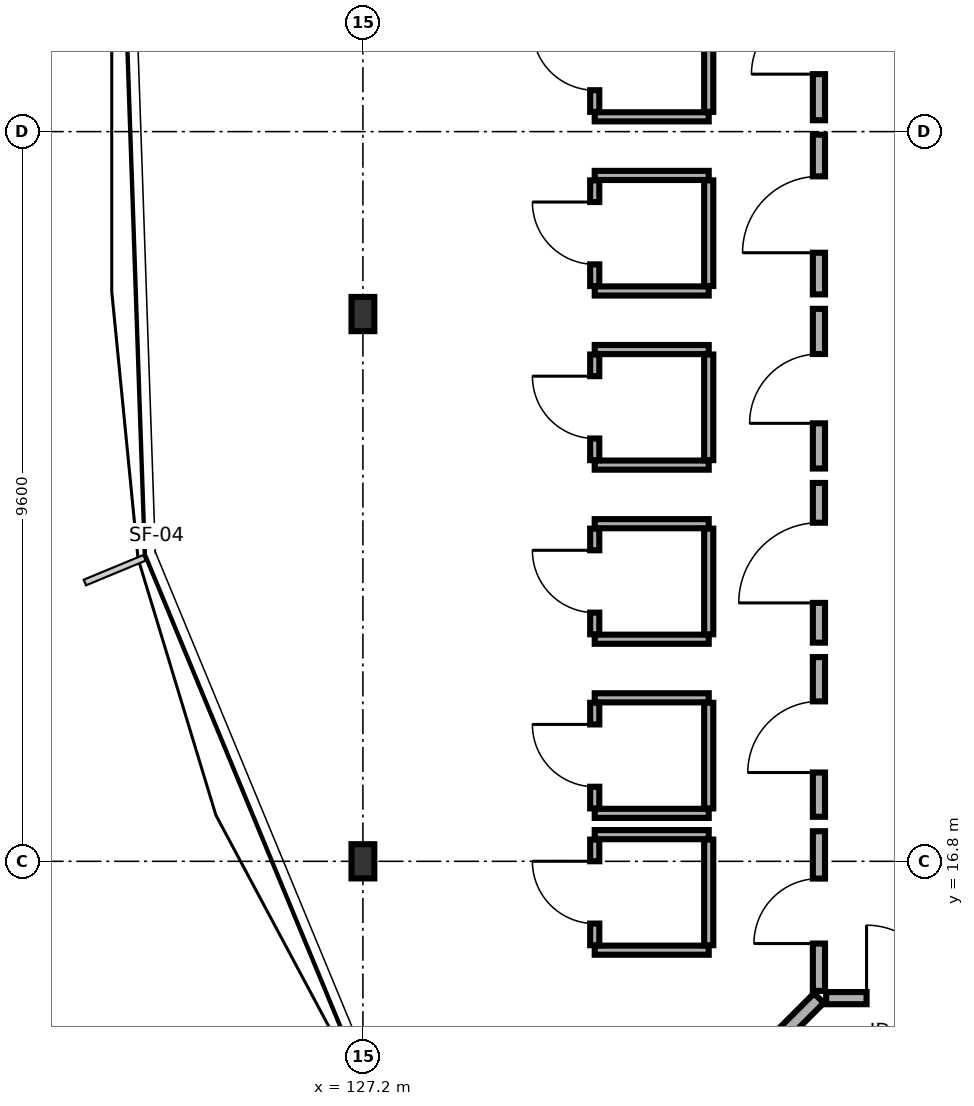
"""IFC4 building model, lengths in metres.
Left out: names, types, materials, properties, quantities, classifications, styles, units other than length and angle.
Written with IfcOpenShell. Run it as: python <this file> out.ifc"""

import sys

from ifc_helpers import new_model, si_unit, direction, frame, frame_2d, origin, origin_2d, place, context, subcontext, project, spatial, rectangle, i_section, extrude, element, fill, save


model = new_model("IFC4")
c1 = context("Model", 3, precision=1e-05, world=origin(), true_north=direction((0.0, 1.0)))
c2 = subcontext(c1, "Body", "Model", "MODEL_VIEW")
j1 = project(units=[si_unit("LENGTHUNIT", "METRE"), si_unit("PLANEANGLEUNIT", "RADIAN")], contexts=[c1])
p1 = place(None, origin())
s1 = spatial("IfcSite", under=j1, at=p1, CompositionType="ELEMENT")
p2 = place(p1, origin())
s2 = spatial("IfcBuilding", under=s1, at=p2, CompositionType="ELEMENT")
p3 = place(p2, frame((0.0, 0.0, 28.3)))
s3 = spatial("IfcBuildingStorey", under=s2, at=p3, CompositionType="ELEMENT", Elevation=28.3)
for number, where, z_axis, x_axis in (
    (1, (127.2, 24.0, 0.0), (0.0, 0.0, 1.0), (1.0, 0.0, 0.0)),
    (2, (127.2, 16.8, 0.0), (0.0, 0.0, 1.0), (1.0, 0.0, 0.0)),
):
    element("IfcColumn", number, at=place(p3, frame(where, z_axis=z_axis, x_axis=x_axis)), inside=s3, PredefinedType="COLUMN", context=c2, shape_type="SweptSolid", body=[
        extrude(i_section(OverallWidth=0.3, OverallDepth=0.45, WebThickness=0.014, FlangeThickness=0.026, FilletRadius=0.027, at=origin_2d()), origin(), (0.0, 0.0, 1.0), 3.4),
    ])
p4 = place(p3, frame((133.295, 15.0, 0.0), z_axis=(0.0, 0.0, 1.0), x_axis=(1.0, 0.0, 0.0)))
e3 = element("IfcWall", 3, at=p4, inside=s3, PredefinedType="PARTITIONING", context=c2, shape_type="SweptSolid", body=[
    extrude(rectangle(XDim=2.024, YDim=0.16, at=frame_2d((1.012, 0.0))), origin(), (0.0, 0.0, 1.0), 3.175),
])
p5 = place(p4, frame((0.532, 0.0, 0.0)))
e4 = element("IfcOpeningElement", 4, at=p5, cuts=e3, PredefinedType="OPENING", context=c2, shape_type="SweptSolid", body=[
    extrude(rectangle(XDim=0.96, YDim=2.13, at=frame_2d((0.48, 1.065))), frame((0.0, 0.09, 0.0), z_axis=(0.0, -1.0, 0.0), x_axis=(1.0, 0.0, 0.0)), (0.0, 0.0, 1.0), 0.18),
])
p6 = place(p3, frame((133.2, 15.0, 0.0), z_axis=(0.0, 0.0, 1.0), x_axis=(-0.707082692656, -0.707130868897, 0.0)))
e5 = element("IfcWall", 5, at=p6, inside=s3, PredefinedType="PARTITIONING", context=c2, shape_type="SweptSolid", body=[
    extrude(rectangle(XDim=5.068, YDim=0.18, at=frame_2d((2.534, 0.0))), origin(), (0.0, 0.0, 1.0), 2.66),
])
p7 = place(p3, frame((133.2, 26.55, 0.0), z_axis=(0.0, 0.0, 1.0), x_axis=(0.0, 1.0, 0.0)))
e6 = element("IfcWall", 6, at=p7, inside=s3, PredefinedType="PARTITIONING", context=c2, shape_type="SweptSolid", body=[
    extrude(rectangle(XDim=2.101, YDim=0.16, at=frame_2d((1.05, 0.0))), origin(), (0.0, 0.0, 1.0), 3.175),
])
p8 = place(p7, frame((0.606, 0.0, 0.0)))
e7 = element("IfcOpeningElement", 7, at=p8, cuts=e6, PredefinedType="OPENING", context=c2, shape_type="SweptSolid", body=[
    extrude(rectangle(XDim=0.888, YDim=2.07, at=frame_2d((0.444, 1.035))), frame((0.0, 0.09, 0.0), z_axis=(0.0, -1.0, 0.0), x_axis=(1.0, 0.0, 0.0)), (0.0, 0.0, 1.0), 0.18),
])
p9 = place(p3, frame((130.25, 26.594, 0.0), z_axis=(0.0, 0.0, 1.0), x_axis=(1.0, 0.0, 0.0)))
e8 = element("IfcWall", 8, at=p9, inside=s3, PredefinedType="PARTITIONING", context=c2, shape_type="SweptSolid", body=[
    extrude(rectangle(XDim=1.5, YDim=0.12, at=frame_2d((0.75, 0.0))), origin(), (0.0, 0.0, 1.0), 3.175),
])
p10 = place(p3, frame((130.25, 26.66, 0.0), z_axis=(0.0, 0.0, 1.0), x_axis=(0.0, 1.0, 0.0)))
e9 = element("IfcWall", 9, at=p10, inside=s3, PredefinedType="PARTITIONING", context=c2, shape_type="SweptSolid", body=[
    extrude(rectangle(XDim=1.39, YDim=0.12, at=frame_2d((0.695, 0.0))), origin(), (0.0, 0.0, 1.0), 3.175),
])
p11 = place(p10, frame((0.285, 0.0, 0.0)))
e10 = element("IfcOpeningElement", 10, at=p11, cuts=e9, PredefinedType="OPENING", context=c2, shape_type="SweptSolid", body=[
    extrude(rectangle(XDim=0.82, YDim=2.08, at=frame_2d((0.41, 1.04))), frame((0.0, 0.07, 0.0), z_axis=(0.0, -1.0, 0.0), x_axis=(1.0, 0.0, 0.0)), (0.0, 0.0, 1.0), 0.14),
])
p12 = place(p3, frame((131.75, 26.66, 0.0), z_axis=(0.0, 0.0, 1.0), x_axis=(0.0, 1.0, 0.0)))
e11 = element("IfcWall", 11, at=p12, inside=s3, PredefinedType="PARTITIONING", context=c2, shape_type="SweptSolid", body=[
    extrude(rectangle(XDim=1.39, YDim=0.12, at=frame_2d((0.695, 0.0))), origin(), (0.0, 0.0, 1.0), 3.175),
])
p13 = place(p3, frame((133.2, 24.259, 0.0), z_axis=(0.0, 0.0, 1.0), x_axis=(0.0, 1.0, 0.0)))
e12 = element("IfcWall", 12, at=p13, inside=s3, PredefinedType="PARTITIONING", context=c2, shape_type="SweptSolid", body=[
    extrude(rectangle(XDim=2.101, YDim=0.16, at=frame_2d((1.051, 0.0))), origin(), (0.0, 0.0, 1.0), 3.175),
])
p14 = place(p13, frame((0.548, 0.0, 0.0)))
e13 = element("IfcOpeningElement", 13, at=p14, cuts=e12, PredefinedType="OPENING", context=c2, shape_type="SweptSolid", body=[
    extrude(rectangle(XDim=1.005, YDim=2.05, at=frame_2d((0.502, 1.025))), frame((0.0, 0.09, 0.0), z_axis=(0.0, -1.0, 0.0), x_axis=(1.0, 0.0, 0.0)), (0.0, 0.0, 1.0), 0.18),
])
for number, where, z_axis, x_axis in (
    (14, (130.25, 24.304, 0.0), (0.0, 0.0, 1.0), (1.0, 0.0, 0.0)),
    (15, (130.25, 25.823, 0.0), (0.0, 0.0, 1.0), (1.0, 0.0, 0.0)),
):
    element("IfcWall", number, at=place(p3, frame(where, z_axis=z_axis, x_axis=x_axis)), inside=s3, PredefinedType="PARTITIONING", context=c2, shape_type="SweptSolid", body=[
        extrude(rectangle(XDim=1.5, YDim=0.12, at=frame_2d((0.75, 0.0))), origin(), (0.0, 0.0, 1.0), 3.175),
    ])
p15 = place(p3, frame((130.25, 24.369, 0.0), z_axis=(0.0, 0.0, 1.0), x_axis=(0.0, 1.0, 0.0)))
e16 = element("IfcWall", 16, at=p15, inside=s3, PredefinedType="PARTITIONING", context=c2, shape_type="SweptSolid", body=[
    extrude(rectangle(XDim=1.39, YDim=0.12, at=frame_2d((0.695, 0.0))), origin(), (0.0, 0.0, 1.0), 3.175),
])
p16 = place(p15, frame((0.285, 0.0, 0.0)))
e17 = element("IfcOpeningElement", 17, at=p16, cuts=e16, PredefinedType="OPENING", context=c2, shape_type="SweptSolid", body=[
    extrude(rectangle(XDim=0.82, YDim=2.08, at=frame_2d((0.41, 1.04))), frame((0.0, 0.07, 0.0), z_axis=(0.0, -1.0, 0.0), x_axis=(1.0, 0.0, 0.0)), (0.0, 0.0, 1.0), 0.14),
])
p17 = place(p3, frame((131.75, 24.369, 0.0), z_axis=(0.0, 0.0, 1.0), x_axis=(0.0, 1.0, 0.0)))
e18 = element("IfcWall", 18, at=p17, inside=s3, PredefinedType="PARTITIONING", context=c2, shape_type="SweptSolid", body=[
    extrude(rectangle(XDim=1.39, YDim=0.12, at=frame_2d((0.695, 0.0))), origin(), (0.0, 0.0, 1.0), 3.175),
])
p18 = place(p3, frame((133.2, 21.968, 0.0), z_axis=(0.0, 0.0, 1.0), x_axis=(0.0, 1.0, 0.0)))
e19 = element("IfcWall", 19, at=p18, inside=s3, PredefinedType="PARTITIONING", context=c2, shape_type="SweptSolid", body=[
    extrude(rectangle(XDim=2.101, YDim=0.16, at=frame_2d((1.05, 0.0))), origin(), (0.0, 0.0, 1.0), 2.71),
])
p19 = place(p18, frame((0.594, 0.0, 0.0)))
e20 = element("IfcOpeningElement", 20, at=p19, cuts=e19, PredefinedType="OPENING", context=c2, shape_type="SweptSolid", body=[
    extrude(rectangle(XDim=0.912, YDim=2.13, at=frame_2d((0.456, 1.065))), frame((0.0, 0.09, 0.0), z_axis=(0.0, -1.0, 0.0), x_axis=(1.0, 0.0, 0.0)), (0.0, 0.0, 1.0), 0.18),
])
for number, where, z_axis, x_axis in (
    (21, (130.25, 22.013, 0.0), (0.0, 0.0, 1.0), (1.0, 0.0, 0.0)),
    (22, (130.25, 23.533, 0.0), (0.0, 0.0, 1.0), (1.0, 0.0, 0.0)),
):
    element("IfcWall", number, at=place(p3, frame(where, z_axis=z_axis, x_axis=x_axis)), inside=s3, PredefinedType="PARTITIONING", context=c2, shape_type="SweptSolid", body=[
        extrude(rectangle(XDim=1.5, YDim=0.12, at=frame_2d((0.75, 0.0))), origin(), (0.0, 0.0, 1.0), 3.175),
    ])
p20 = place(p3, frame((130.25, 22.078, 0.0), z_axis=(0.0, 0.0, 1.0), x_axis=(0.0, 1.0, 0.0)))
e23 = element("IfcWall", 23, at=p20, inside=s3, PredefinedType="PARTITIONING", context=c2, shape_type="SweptSolid", body=[
    extrude(rectangle(XDim=1.39, YDim=0.12, at=frame_2d((0.695, 0.0))), origin(), (0.0, 0.0, 1.0), 3.175),
])
p21 = place(p20, frame((0.285, 0.0, 0.0)))
e24 = element("IfcOpeningElement", 24, at=p21, cuts=e23, PredefinedType="OPENING", context=c2, shape_type="SweptSolid", body=[
    extrude(rectangle(XDim=0.82, YDim=2.08, at=frame_2d((0.41, 1.04))), frame((0.0, 0.07, 0.0), z_axis=(0.0, -1.0, 0.0), x_axis=(1.0, 0.0, 0.0)), (0.0, 0.0, 1.0), 0.14),
])
p22 = place(p3, frame((131.75, 22.078, 0.0), z_axis=(0.0, 0.0, 1.0), x_axis=(0.0, 1.0, 0.0)))
e25 = element("IfcWall", 25, at=p22, inside=s3, PredefinedType="PARTITIONING", context=c2, shape_type="SweptSolid", body=[
    extrude(rectangle(XDim=1.39, YDim=0.12, at=frame_2d((0.695, 0.0))), origin(), (0.0, 0.0, 1.0), 3.175),
])
p23 = place(p3, frame((133.2, 19.677, 0.0), z_axis=(0.0, 0.0, 1.0), x_axis=(0.0, 1.0, 0.0)))
e26 = element("IfcWall", 26, at=p23, inside=s3, PredefinedType="PARTITIONING", context=c2, shape_type="SweptSolid", body=[
    extrude(rectangle(XDim=2.101, YDim=0.16, at=frame_2d((1.05, 0.0))), origin(), (0.0, 0.0, 1.0), 3.175),
])
p24 = place(p23, frame((0.523, 0.0, 0.0)))
e27 = element("IfcOpeningElement", 27, at=p24, cuts=e26, PredefinedType="OPENING", context=c2, shape_type="SweptSolid", body=[
    extrude(rectangle(XDim=1.055, YDim=2.05, at=frame_2d((0.527, 1.025))), frame((0.0, 0.09, 0.0), z_axis=(0.0, -1.0, 0.0), x_axis=(1.0, 0.0, 0.0)), (0.0, 0.0, 1.0), 0.18),
])
for number, where, z_axis, x_axis in (
    (28, (130.25, 19.722, 0.0), (0.0, 0.0, 1.0), (1.0, 0.0, 0.0)),
    (29, (130.25, 21.242, 0.0), (0.0, 0.0, 1.0), (1.0, 0.0, 0.0)),
):
    element("IfcWall", number, at=place(p3, frame(where, z_axis=z_axis, x_axis=x_axis)), inside=s3, PredefinedType="PARTITIONING", context=c2, shape_type="SweptSolid", body=[
        extrude(rectangle(XDim=1.5, YDim=0.12, at=frame_2d((0.75, 0.0))), origin(), (0.0, 0.0, 1.0), 3.175),
    ])
p25 = place(p3, frame((130.25, 19.787, 0.0), z_axis=(0.0, 0.0, 1.0), x_axis=(0.0, 1.0, 0.0)))
e30 = element("IfcWall", 30, at=p25, inside=s3, PredefinedType="PARTITIONING", context=c2, shape_type="SweptSolid", body=[
    extrude(rectangle(XDim=1.39, YDim=0.12, at=frame_2d((0.695, 0.0))), origin(), (0.0, 0.0, 1.0), 3.175),
])
p26 = place(p25, frame((0.285, 0.0, 0.0)))
e31 = element("IfcOpeningElement", 31, at=p26, cuts=e30, PredefinedType="OPENING", context=c2, shape_type="SweptSolid", body=[
    extrude(rectangle(XDim=0.82, YDim=2.08, at=frame_2d((0.41, 1.04))), frame((0.0, 0.07, 0.0), z_axis=(0.0, -1.0, 0.0), x_axis=(1.0, 0.0, 0.0)), (0.0, 0.0, 1.0), 0.14),
])
p27 = place(p3, frame((131.75, 19.787, 0.0), z_axis=(0.0, 0.0, 1.0), x_axis=(0.0, 1.0, 0.0)))
e32 = element("IfcWall", 32, at=p27, inside=s3, PredefinedType="PARTITIONING", context=c2, shape_type="SweptSolid", body=[
    extrude(rectangle(XDim=1.39, YDim=0.12, at=frame_2d((0.695, 0.0))), origin(), (0.0, 0.0, 1.0), 3.175),
])
p28 = place(p3, frame((133.2, 17.386, 0.0), z_axis=(0.0, 0.0, 1.0), x_axis=(0.0, 1.0, 0.0)))
e33 = element("IfcWall", 33, at=p28, inside=s3, PredefinedType="PARTITIONING", context=c2, shape_type="SweptSolid", body=[
    extrude(rectangle(XDim=2.101, YDim=0.16, at=frame_2d((1.05, 0.0))), origin(), (0.0, 0.0, 1.0), 3.175),
])
p29 = place(p28, frame((0.583, 0.0, 0.0)))
e34 = element("IfcOpeningElement", 34, at=p29, cuts=e33, PredefinedType="OPENING", context=c2, shape_type="SweptSolid", body=[
    extrude(rectangle(XDim=0.936, YDim=2.07, at=frame_2d((0.468, 1.035))), frame((0.0, 0.09, 0.0), z_axis=(0.0, -1.0, 0.0), x_axis=(1.0, 0.0, 0.0)), (0.0, 0.0, 1.0), 0.18),
])
for number, where, z_axis, x_axis in (
    (35, (130.25, 17.431, 0.0), (0.0, 0.0, 1.0), (1.0, 0.0, 0.0)),
    (36, (130.25, 18.951, 0.0), (0.0, 0.0, 1.0), (1.0, 0.0, 0.0)),
):
    element("IfcWall", number, at=place(p3, frame(where, z_axis=z_axis, x_axis=x_axis)), inside=s3, PredefinedType="PARTITIONING", context=c2, shape_type="SweptSolid", body=[
        extrude(rectangle(XDim=1.5, YDim=0.12, at=frame_2d((0.75, 0.0))), origin(), (0.0, 0.0, 1.0), 3.175),
    ])
p30 = place(p3, frame((130.25, 17.496, 0.0), z_axis=(0.0, 0.0, 1.0), x_axis=(0.0, 1.0, 0.0)))
e37 = element("IfcWall", 37, at=p30, inside=s3, PredefinedType="PARTITIONING", context=c2, shape_type="SweptSolid", body=[
    extrude(rectangle(XDim=1.39, YDim=0.12, at=frame_2d((0.695, 0.0))), origin(), (0.0, 0.0, 1.0), 3.175),
])
p31 = place(p30, frame((0.285, 0.0, 0.0)))
e38 = element("IfcOpeningElement", 38, at=p31, cuts=e37, PredefinedType="OPENING", context=c2, shape_type="SweptSolid", body=[
    extrude(rectangle(XDim=0.82, YDim=2.08, at=frame_2d((0.41, 1.04))), frame((0.0, 0.07, 0.0), z_axis=(0.0, -1.0, 0.0), x_axis=(1.0, 0.0, 0.0)), (0.0, 0.0, 1.0), 0.14),
])
p32 = place(p3, frame((131.75, 17.496, 0.0), z_axis=(0.0, 0.0, 1.0), x_axis=(0.0, 1.0, 0.0)))
e39 = element("IfcWall", 39, at=p32, inside=s3, PredefinedType="PARTITIONING", context=c2, shape_type="SweptSolid", body=[
    extrude(rectangle(XDim=1.39, YDim=0.12, at=frame_2d((0.695, 0.0))), origin(), (0.0, 0.0, 1.0), 3.175),
])
p33 = place(p3, frame((133.2, 15.095, 0.0), z_axis=(0.0, 0.0, 1.0), x_axis=(0.0, 1.0, 0.0)))
e40 = element("IfcWall", 40, at=p33, inside=s3, PredefinedType="PARTITIONING", context=c2, shape_type="SweptSolid", body=[
    extrude(rectangle(XDim=2.101, YDim=0.16, at=frame_2d((1.05, 0.0))), origin(), (0.0, 0.0, 1.0), 2.71),
])
p34 = place(p33, frame((0.623, 0.0, 0.0)))
e41 = element("IfcOpeningElement", 41, at=p34, cuts=e40, PredefinedType="OPENING", context=c2, shape_type="SweptSolid", body=[
    extrude(rectangle(XDim=0.855, YDim=2.05, at=frame_2d((0.427, 1.025))), frame((0.0, 0.09, 0.0), z_axis=(0.0, -1.0, 0.0), x_axis=(1.0, 0.0, 0.0)), (0.0, 0.0, 1.0), 0.18),
])
for number, where, z_axis, x_axis in (
    (42, (130.25, 15.631, 0.0), (0.0, 0.0, 1.0), (1.0, 0.0, 0.0)),
    (43, (130.25, 17.151, 0.0), (0.0, 0.0, 1.0), (1.0, 0.0, 0.0)),
):
    element("IfcWall", number, at=place(p3, frame(where, z_axis=z_axis, x_axis=x_axis)), inside=s3, PredefinedType="PARTITIONING", context=c2, shape_type="SweptSolid", body=[
        extrude(rectangle(XDim=1.5, YDim=0.12, at=frame_2d((0.75, 0.0))), origin(), (0.0, 0.0, 1.0), 3.175),
    ])
p35 = place(p3, frame((130.25, 15.696, 0.0), z_axis=(0.0, 0.0, 1.0), x_axis=(0.0, 1.0, 0.0)))
e44 = element("IfcWall", 44, at=p35, inside=s3, PredefinedType="PARTITIONING", context=c2, shape_type="SweptSolid", body=[
    extrude(rectangle(XDim=1.39, YDim=0.12, at=frame_2d((0.695, 0.0))), origin(), (0.0, 0.0, 1.0), 2.71),
])
p36 = place(p35, frame((0.285, 0.0, 0.0)))
e45 = element("IfcOpeningElement", 45, at=p36, cuts=e44, PredefinedType="OPENING", context=c2, shape_type="SweptSolid", body=[
    extrude(rectangle(XDim=0.82, YDim=2.08, at=frame_2d((0.41, 1.04))), frame((0.0, 0.07, 0.0), z_axis=(0.0, -1.0, 0.0), x_axis=(1.0, 0.0, 0.0)), (0.0, 0.0, 1.0), 0.14),
])
p37 = place(p3, frame((131.75, 15.696, 0.0), z_axis=(0.0, 0.0, 1.0), x_axis=(0.0, 1.0, 0.0)))
e46 = element("IfcWall", 46, at=p37, inside=s3, PredefinedType="PARTITIONING", context=c2, shape_type="SweptSolid", body=[
    extrude(rectangle(XDim=1.39, YDim=0.12, at=frame_2d((0.695, 0.0))), origin(), (0.0, 0.0, 1.0), 2.71),
])
p38 = place(p5, origin())
e47 = element("IfcDoor", 47, at=p38, inside=s3, OperationType="SINGLE_SWING_LEFT", PredefinedType="DOOR", context=c2, shape_type="SweptSolid", body=[
    extrude(rectangle(XDim=0.96, YDim=2.13, at=frame_2d((0.48, 1.065))), frame((0.0, 0.025, 0.0), z_axis=(0.0, -1.0, 0.0), x_axis=(1.0, 0.0, 0.0)), (0.0, 0.0, 1.0), 0.05),
])
fill(e4, e47)
p39 = place(p8, origin())
e48 = element("IfcDoor", 48, at=p39, inside=s3, OperationType="SINGLE_SWING_LEFT", PredefinedType="DOOR", context=c2, shape_type="SweptSolid", body=[
    extrude(rectangle(XDim=0.888, YDim=2.07, at=frame_2d((0.444, 1.035))), frame((0.0, 0.025, 0.0), z_axis=(0.0, -1.0, 0.0), x_axis=(1.0, 0.0, 0.0)), (0.0, 0.0, 1.0), 0.05),
])
fill(e7, e48)
p40 = place(p11, origin())
e49 = element("IfcDoor", 49, at=p40, inside=s3, OperationType="SINGLE_SWING_RIGHT", PredefinedType="DOOR", context=c2, shape_type="SweptSolid", body=[
    extrude(rectangle(XDim=0.82, YDim=2.08, at=frame_2d((0.41, 1.04))), frame((0.0, 0.025, 0.0), z_axis=(0.0, -1.0, 0.0), x_axis=(1.0, 0.0, 0.0)), (0.0, 0.0, 1.0), 0.05),
])
fill(e10, e49)
p41 = place(p14, origin())
e50 = element("IfcDoor", 50, at=p41, inside=s3, OperationType="SINGLE_SWING_LEFT", PredefinedType="DOOR", context=c2, shape_type="SweptSolid", body=[
    extrude(rectangle(XDim=1.005, YDim=2.05, at=frame_2d((0.502, 1.025))), frame((0.0, 0.025, 0.0), z_axis=(0.0, -1.0, 0.0), x_axis=(1.0, 0.0, 0.0)), (0.0, 0.0, 1.0), 0.05),
])
fill(e13, e50)
p42 = place(p16, origin())
e51 = element("IfcDoor", 51, at=p42, inside=s3, OperationType="SINGLE_SWING_RIGHT", PredefinedType="DOOR", context=c2, shape_type="SweptSolid", body=[
    extrude(rectangle(XDim=0.82, YDim=2.08, at=frame_2d((0.41, 1.04))), frame((0.0, 0.025, 0.0), z_axis=(0.0, -1.0, 0.0), x_axis=(1.0, 0.0, 0.0)), (0.0, 0.0, 1.0), 0.05),
])
fill(e17, e51)
p43 = place(p19, origin())
e52 = element("IfcDoor", 52, at=p43, inside=s3, OperationType="SINGLE_SWING_LEFT", PredefinedType="DOOR", context=c2, shape_type="SweptSolid", body=[
    extrude(rectangle(XDim=0.912, YDim=2.13, at=frame_2d((0.456, 1.065))), frame((0.0, 0.025, 0.0), z_axis=(0.0, -1.0, 0.0), x_axis=(1.0, 0.0, 0.0)), (0.0, 0.0, 1.0), 0.05),
])
fill(e20, e52)
p44 = place(p21, origin())
e53 = element("IfcDoor", 53, at=p44, inside=s3, OperationType="SINGLE_SWING_RIGHT", PredefinedType="DOOR", context=c2, shape_type="SweptSolid", body=[
    extrude(rectangle(XDim=0.82, YDim=2.08, at=frame_2d((0.41, 1.04))), frame((0.0, 0.025, 0.0), z_axis=(0.0, -1.0, 0.0), x_axis=(1.0, 0.0, 0.0)), (0.0, 0.0, 1.0), 0.05),
])
fill(e24, e53)
p45 = place(p24, origin())
e54 = element("IfcDoor", 54, at=p45, inside=s3, OperationType="SINGLE_SWING_LEFT", PredefinedType="DOOR", context=c2, shape_type="SweptSolid", body=[
    extrude(rectangle(XDim=1.055, YDim=2.05, at=frame_2d((0.527, 1.025))), frame((0.0, 0.025, 0.0), z_axis=(0.0, -1.0, 0.0), x_axis=(1.0, 0.0, 0.0)), (0.0, 0.0, 1.0), 0.05),
])
fill(e27, e54)
p46 = place(p26, origin())
e55 = element("IfcDoor", 55, at=p46, inside=s3, OperationType="SINGLE_SWING_RIGHT", PredefinedType="DOOR", context=c2, shape_type="SweptSolid", body=[
    extrude(rectangle(XDim=0.82, YDim=2.08, at=frame_2d((0.41, 1.04))), frame((0.0, 0.025, 0.0), z_axis=(0.0, -1.0, 0.0), x_axis=(1.0, 0.0, 0.0)), (0.0, 0.0, 1.0), 0.05),
])
fill(e31, e55)
p47 = place(p29, origin())
e56 = element("IfcDoor", 56, at=p47, inside=s3, OperationType="SINGLE_SWING_LEFT", PredefinedType="DOOR", context=c2, shape_type="SweptSolid", body=[
    extrude(rectangle(XDim=0.936, YDim=2.07, at=frame_2d((0.468, 1.035))), frame((0.0, 0.025, 0.0), z_axis=(0.0, -1.0, 0.0), x_axis=(1.0, 0.0, 0.0)), (0.0, 0.0, 1.0), 0.05),
])
fill(e34, e56)
p48 = place(p31, origin())
e57 = element("IfcDoor", 57, at=p48, inside=s3, OperationType="SINGLE_SWING_RIGHT", PredefinedType="DOOR", context=c2, shape_type="SweptSolid", body=[
    extrude(rectangle(XDim=0.82, YDim=2.08, at=frame_2d((0.41, 1.04))), frame((0.0, 0.025, 0.0), z_axis=(0.0, -1.0, 0.0), x_axis=(1.0, 0.0, 0.0)), (0.0, 0.0, 1.0), 0.05),
])
fill(e38, e57)
p49 = place(p34, origin())
e58 = element("IfcDoor", 58, at=p49, inside=s3, OperationType="SINGLE_SWING_LEFT", PredefinedType="DOOR", context=c2, shape_type="SweptSolid", body=[
    extrude(rectangle(XDim=0.855, YDim=2.05, at=frame_2d((0.427, 1.025))), frame((0.0, 0.025, 0.0), z_axis=(0.0, -1.0, 0.0), x_axis=(1.0, 0.0, 0.0)), (0.0, 0.0, 1.0), 0.05),
])
fill(e41, e58)
p50 = place(p36, origin())
e59 = element("IfcDoor", 59, at=p50, inside=s3, OperationType="SINGLE_SWING_RIGHT", PredefinedType="DOOR", context=c2, shape_type="SweptSolid", body=[
    extrude(rectangle(XDim=0.82, YDim=2.08, at=frame_2d((0.41, 1.04))), frame((0.0, 0.025, 0.0), z_axis=(0.0, -1.0, 0.0), x_axis=(1.0, 0.0, 0.0)), (0.0, 0.0, 1.0), 0.05),
])
fill(e45, e59)
save(model, sys.argv[1])
